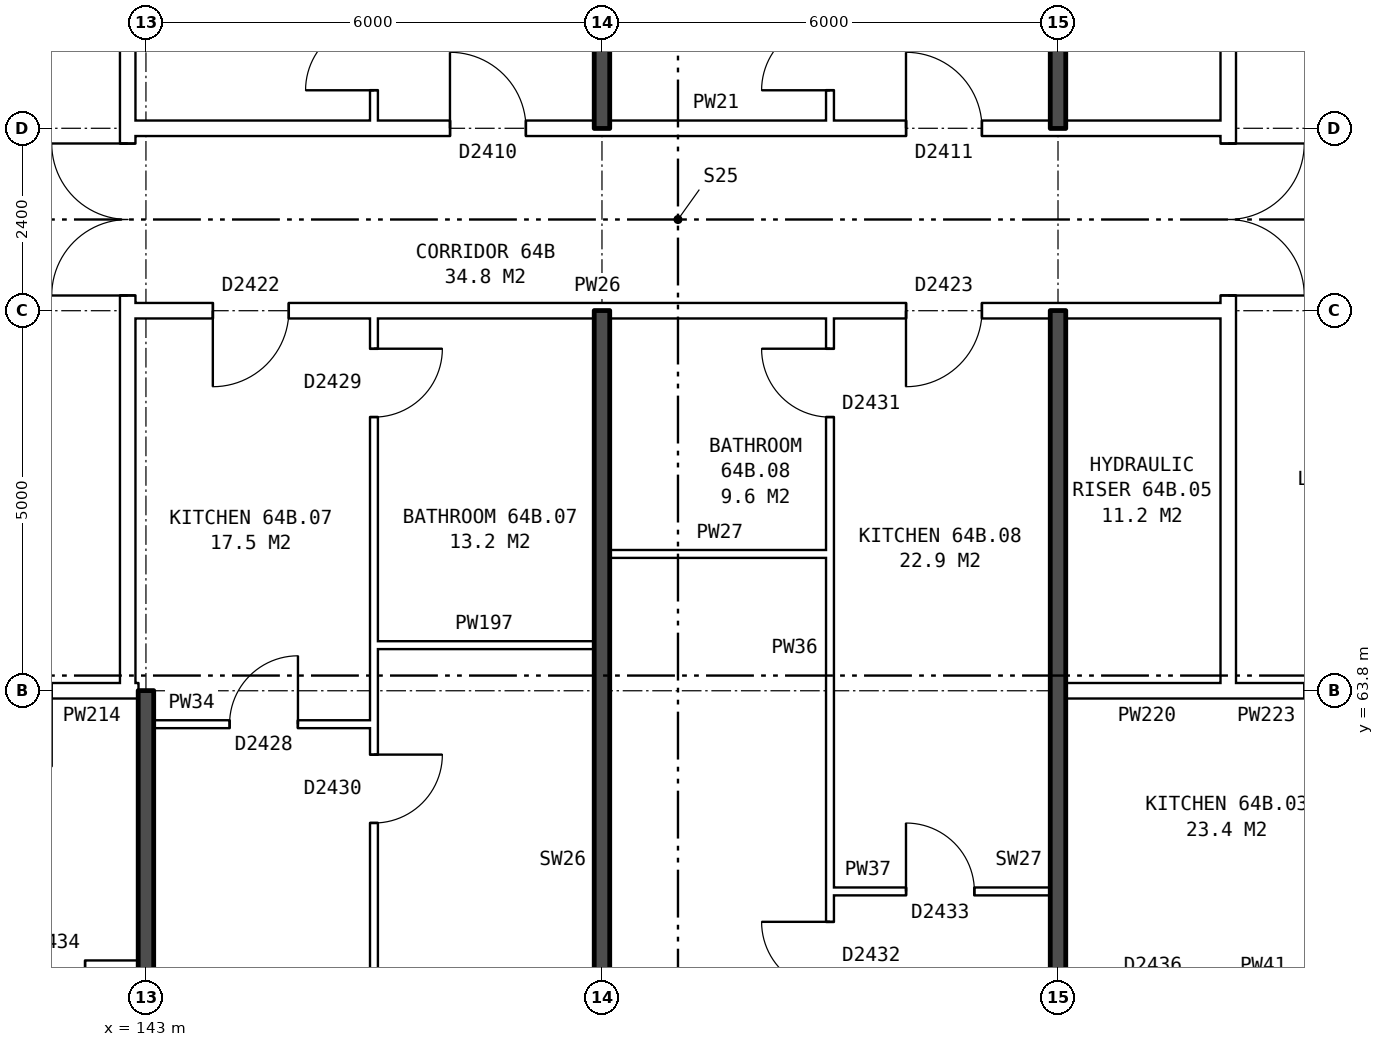
"""IFC4 building model, lengths in metres.
Left out: names, types, materials, properties, quantities, classifications, styles, units other than length and angle.
Written with IfcOpenShell. Run it as: python <this file> out.ifc"""

import sys

from ifc_helpers import new_model, si_unit, direction, frame, frame_2d, origin, place, context, subcontext, project, spatial, rectangle, extrude, element, fill, save


model = new_model("IFC4")
c1 = context("Model", 3, precision=1e-05, world=origin(), true_north=direction((0.0, 1.0)))
c2 = subcontext(c1, "Body", "Model", "MODEL_VIEW")
j1 = project(units=[si_unit("LENGTHUNIT", "METRE"), si_unit("PLANEANGLEUNIT", "RADIAN")], contexts=[c1])
p1 = place(None, origin())
s1 = spatial("IfcSite", under=j1, at=p1, CompositionType="ELEMENT")
p2 = place(p1, origin())
s2 = spatial("IfcBuilding", under=s1, at=p2, CompositionType="ELEMENT")
p3 = place(p2, frame((0.0, 0.0, 227.6)))
s3 = spatial("IfcBuildingStorey", under=s2, at=p3, CompositionType="ELEMENT", Elevation=227.6)
p4 = place(p3, frame((142.76, 63.9, 0.0), z_axis=(0.0, 0.0, 1.0), x_axis=(0.0, 1.0, 0.0)))
e1 = element("IfcWall", 1, at=p4, inside=s3, PredefinedType="PARTITIONING", context=c2, shape_type="SweptSolid", body=[
    extrude(rectangle(XDim=12.2, YDim=0.2, at=frame_2d((6.1, 0.0))), origin(), (0.0, 0.0, 1.0), 2.85),
])
p5 = place(p4, frame((5.1, 0.0, 0.0)))
e2 = element("IfcOpeningElement", 2, at=p5, cuts=e1, PredefinedType="OPENING", context=c2, shape_type="SweptSolid", body=[
    extrude(rectangle(XDim=2.0, YDim=2.1, at=frame_2d((1.0, 1.05))), frame((0.0, 0.11, 0.0), z_axis=(0.0, -1.0, 0.0), x_axis=(1.0, 0.0, 0.0)), (0.0, 0.0, 1.0), 0.22),
])
p6 = place(p3, frame((157.24, 63.9, 0.0), z_axis=(0.0, 0.0, 1.0), x_axis=(0.0, 1.0, 0.0)))
e3 = element("IfcWall", 3, at=p6, inside=s3, PredefinedType="PARTITIONING", context=c2, shape_type="SweptSolid", body=[
    extrude(rectangle(XDim=12.2, YDim=0.2, at=frame_2d((6.1, 0.0))), origin(), (0.0, 0.0, 1.0), 2.85),
])
p7 = place(p6, frame((5.1, 0.0, 0.0)))
e4 = element("IfcOpeningElement", 4, at=p7, cuts=e3, PredefinedType="OPENING", context=c2, shape_type="SweptSolid", body=[
    extrude(rectangle(XDim=2.0, YDim=2.1, at=frame_2d((1.0, 1.05))), frame((0.0, 0.11, 0.0), z_axis=(0.0, -1.0, 0.0), x_axis=(1.0, 0.0, 0.0)), (0.0, 0.0, 1.0), 0.22),
])
p8 = place(p3, frame((137.1, 60.2, 0.0), z_axis=(0.0, 0.0, 1.0), x_axis=(1.0, 0.0, 0.0)))
e5 = element("IfcWall", 5, at=p8, inside=s3, PredefinedType="PARTITIONING", context=c2, shape_type="SweptSolid", body=[
    extrude(rectangle(XDim=5.8, YDim=0.1, at=frame_2d((2.9, 0.0))), origin(), (0.0, 0.0, 1.0), 2.85),
])
p9 = place(p8, frame((1.3, 0.0, 0.0)))
e6 = element("IfcOpeningElement", 6, at=p9, cuts=e5, PredefinedType="OPENING", context=c2, shape_type="SweptSolid", body=[
    extrude(rectangle(XDim=0.9, YDim=2.1, at=frame_2d((0.45, 1.05))), frame((0.0, 0.06, 0.0), z_axis=(0.0, -1.0, 0.0), x_axis=(1.0, 0.0, 0.0)), (0.0, 0.0, 1.0), 0.12),
])
p10 = place(p8, frame((4.2, 0.0, 0.0)))
e7 = element("IfcOpeningElement", 7, at=p10, cuts=e5, PredefinedType="OPENING", context=c2, shape_type="SweptSolid", body=[
    extrude(rectangle(XDim=0.9, YDim=2.1, at=frame_2d((0.45, 1.05))), frame((0.0, 0.06, 0.0), z_axis=(0.0, -1.0, 0.0), x_axis=(1.0, 0.0, 0.0)), (0.0, 0.0, 1.0), 0.12),
])
p11 = place(p3, frame((152.0, 61.16, 0.0), z_axis=(0.0, 0.0, 1.0), x_axis=(1.0, 0.0, 0.0)))
e8 = element("IfcWall", 8, at=p11, inside=s3, PredefinedType="PARTITIONING", context=c2, shape_type="SweptSolid", body=[
    extrude(rectangle(XDim=2.9, YDim=0.1, at=frame_2d((1.45, 0.0))), origin(), (0.0, 0.0, 1.0), 2.85),
])
p12 = place(p11, frame((1.0, 0.0, 0.0)))
e9 = element("IfcOpeningElement", 9, at=p12, cuts=e8, PredefinedType="OPENING", context=c2, shape_type="SweptSolid", body=[
    extrude(rectangle(XDim=0.9, YDim=2.1, at=frame_2d((0.45, 1.05))), frame((0.0, 0.06, 0.0), z_axis=(0.0, -1.0, 0.0), x_axis=(1.0, 0.0, 0.0)), (0.0, 0.0, 1.0), 0.12),
])
p13 = place(p3, frame((143.1, 63.36, 0.0), z_axis=(0.0, 0.0, 1.0), x_axis=(1.0, 0.0, 0.0)))
e10 = element("IfcWall", 10, at=p13, inside=s3, PredefinedType="PARTITIONING", context=c2, shape_type="SweptSolid", body=[
    extrude(rectangle(XDim=2.9, YDim=0.1, at=frame_2d((1.45, 0.0))), origin(), (0.0, 0.0, 1.0), 2.85),
])
p14 = place(p13, frame((1.0, 0.0, 0.0)))
e11 = element("IfcOpeningElement", 11, at=p14, cuts=e10, PredefinedType="OPENING", context=c2, shape_type="SweptSolid", body=[
    extrude(rectangle(XDim=0.9, YDim=2.1, at=frame_2d((0.45, 1.05))), frame((0.0, 0.06, 0.0), z_axis=(0.0, -1.0, 0.0), x_axis=(1.0, 0.0, 0.0)), (0.0, 0.0, 1.0), 0.12),
])
p15 = place(p3, frame((139.76, 63.8, 0.0), z_axis=(0.0, 0.0, 1.0), x_axis=(1.0, 0.0, 0.0)))
e12 = element("IfcWall", 12, at=p15, inside=s3, PredefinedType="PARTITIONING", context=c2, shape_type="SweptSolid", body=[
    extrude(rectangle(XDim=3.0, YDim=0.2, at=frame_2d((1.5, 0.0))), origin(), (0.0, 0.0, 1.0), 2.85),
])
p16 = place(p15, frame((1.0, 0.0, 0.0)))
e13 = element("IfcOpeningElement", 13, at=p16, cuts=e12, PredefinedType="OPENING", context=c2, shape_type="SweptSolid", body=[
    extrude(rectangle(XDim=1.0, YDim=2.1, at=frame_2d((0.5, 1.05))), frame((0.0, 0.11, 0.0), z_axis=(0.0, -1.0, 0.0), x_axis=(1.0, 0.0, 0.0)), (0.0, 0.0, 1.0), 0.22),
])
p17 = place(p3, frame((142.76, 63.8, 0.0), z_axis=(0.0, 0.0, 1.0), x_axis=(1.0, 0.0, 0.0)))
e14 = element("IfcWall", 14, at=p17, inside=s3, PredefinedType="PARTITIONING", context=c2, shape_type="SweptSolid", body=[
    extrude(rectangle(XDim=0.14, YDim=0.2, at=frame_2d((0.07, 0.0))), origin(), (0.0, 0.0, 1.0), 2.85),
])
p18 = place(p3, frame((155.1, 63.8, 0.0), z_axis=(0.0, 0.0, 1.0), x_axis=(1.0, 0.0, 0.0)))
e15 = element("IfcWall", 15, at=p18, inside=s3, PredefinedType="PARTITIONING", context=c2, shape_type="SweptSolid", body=[
    extrude(rectangle(XDim=2.14, YDim=0.2, at=frame_2d((1.07, 0.0))), origin(), (0.0, 0.0, 1.0), 2.85),
])
p19 = place(p3, frame((157.24, 63.8, 0.0), z_axis=(0.0, 0.0, 1.0), x_axis=(1.0, 0.0, 0.0)))
e16 = element("IfcWall", 16, at=p19, inside=s3, PredefinedType="PARTITIONING", context=c2, shape_type="SweptSolid", body=[
    extrude(rectangle(XDim=3.0, YDim=0.2, at=frame_2d((1.5, 0.0))), origin(), (0.0, 0.0, 1.0), 2.85),
])
p20 = place(p19, frame((1.0, 0.0, 0.0)))
e17 = element("IfcOpeningElement", 17, at=p20, cuts=e16, PredefinedType="OPENING", context=c2, shape_type="SweptSolid", body=[
    extrude(rectangle(XDim=1.0, YDim=2.1, at=frame_2d((0.5, 1.05))), frame((0.0, 0.11, 0.0), z_axis=(0.0, -1.0, 0.0), x_axis=(1.0, 0.0, 0.0)), (0.0, 0.0, 1.0), 0.22),
])
for number, where, z_axis, x_axis in (
    (18, (146.0, 64.4, 0.0), (0.0, 0.0, 1.0), (1.0, 0.0, 0.0)),
    (19, (149.1, 65.6, 0.0), (0.0, 0.0, 1.0), (1.0, 0.0, 0.0)),
):
    element("IfcWall", number, at=place(p3, frame(where, z_axis=z_axis, x_axis=x_axis)), inside=s3, PredefinedType="PARTITIONING", context=c2, shape_type="SweptSolid", body=[
        extrude(rectangle(XDim=2.9, YDim=0.1, at=frame_2d((1.45, 0.0))), origin(), (0.0, 0.0, 1.0), 2.85),
    ])
p21 = place(p3, frame((142.76, 68.8, 0.0), z_axis=(0.0, 0.0, 1.0), x_axis=(1.0, 0.0, 0.0)))
e20 = element("IfcWall", 20, at=p21, inside=s3, PredefinedType="PARTITIONING", context=c2, shape_type="SweptSolid", body=[
    extrude(rectangle(XDim=14.48, YDim=0.2, at=frame_2d((7.24, 0.0))), origin(), (0.0, 0.0, 1.0), 2.85),
])
p22 = place(p21, frame((1.12, 0.0, 0.0)))
e21 = element("IfcOpeningElement", 21, at=p22, cuts=e20, PredefinedType="OPENING", context=c2, shape_type="SweptSolid", body=[
    extrude(rectangle(XDim=1.0, YDim=2.1, at=frame_2d((0.5, 1.05))), frame((0.0, 0.11, 0.0), z_axis=(0.0, -1.0, 0.0), x_axis=(1.0, 0.0, 0.0)), (0.0, 0.0, 1.0), 0.22),
])
p23 = place(p21, frame((10.24, 0.0, 0.0)))
e22 = element("IfcOpeningElement", 22, at=p23, cuts=e20, PredefinedType="OPENING", context=c2, shape_type="SweptSolid", body=[
    extrude(rectangle(XDim=1.0, YDim=2.1, at=frame_2d((0.5, 1.05))), frame((0.0, 0.11, 0.0), z_axis=(0.0, -1.0, 0.0), x_axis=(1.0, 0.0, 0.0)), (0.0, 0.0, 1.0), 0.22),
])
p24 = place(p3, frame((142.76, 71.2, 0.0), z_axis=(0.0, 0.0, 1.0), x_axis=(1.0, 0.0, 0.0)))
e23 = element("IfcWall", 23, at=p24, inside=s3, PredefinedType="PARTITIONING", context=c2, shape_type="SweptSolid", body=[
    extrude(rectangle(XDim=14.48, YDim=0.2, at=frame_2d((7.24, 0.0))), origin(), (0.0, 0.0, 1.0), 2.85),
])
p25 = place(p24, frame((4.24, 0.0, 0.0)))
e24 = element("IfcOpeningElement", 24, at=p25, cuts=e23, PredefinedType="OPENING", context=c2, shape_type="SweptSolid", body=[
    extrude(rectangle(XDim=1.0, YDim=2.1, at=frame_2d((0.5, 1.05))), frame((0.0, 0.11, 0.0), z_axis=(0.0, -1.0, 0.0), x_axis=(1.0, 0.0, 0.0)), (0.0, 0.0, 1.0), 0.22),
])
p26 = place(p24, frame((10.24, 0.0, 0.0)))
e25 = element("IfcOpeningElement", 25, at=p26, cuts=e23, PredefinedType="OPENING", context=c2, shape_type="SweptSolid", body=[
    extrude(rectangle(XDim=1.0, YDim=2.1, at=frame_2d((0.5, 1.05))), frame((0.0, 0.11, 0.0), z_axis=(0.0, -1.0, 0.0), x_axis=(1.0, 0.0, 0.0)), (0.0, 0.0, 1.0), 0.22),
])
p27 = place(p3, frame((143.0, 54.36, 0.0), z_axis=(0.0, 0.0, 1.0), x_axis=(0.0, 1.0, 0.0)))
e26 = element("IfcWall", 26, at=p27, inside=s3, PredefinedType="SOLIDWALL", context=c2, shape_type="SweptSolid", body=[
    extrude(rectangle(XDim=9.44, YDim=0.2, at=frame_2d((4.72, 0.0))), origin(), (0.0, 0.0, 1.0), 2.85),
])
p28 = place(p3, frame((146.0, 54.36, 0.0), z_axis=(0.0, 0.0, 1.0), x_axis=(0.0, 1.0, 0.0)))
e27 = element("IfcWall", 27, at=p28, inside=s3, PredefinedType="PARTITIONING", context=c2, shape_type="SweptSolid", body=[
    extrude(rectangle(XDim=14.34, YDim=0.1, at=frame_2d((7.17, 0.0))), origin(), (0.0, 0.0, 1.0), 2.85),
])
p29 = place(p28, frame((7.7, 0.0, 0.0)))
e28 = element("IfcOpeningElement", 28, at=p29, cuts=e27, PredefinedType="OPENING", context=c2, shape_type="SweptSolid", body=[
    extrude(rectangle(XDim=0.9, YDim=2.1, at=frame_2d((0.45, 1.05))), frame((0.0, 0.06, 0.0), z_axis=(0.0, -1.0, 0.0), x_axis=(1.0, 0.0, 0.0)), (0.0, 0.0, 1.0), 0.12),
])
p30 = place(p28, frame((13.04, 0.0, 0.0)))
e29 = element("IfcOpeningElement", 29, at=p30, cuts=e27, PredefinedType="OPENING", context=c2, shape_type="SweptSolid", body=[
    extrude(rectangle(XDim=0.9, YDim=2.1, at=frame_2d((0.45, 1.05))), frame((0.0, 0.06, 0.0), z_axis=(0.0, -1.0, 0.0), x_axis=(1.0, 0.0, 0.0)), (0.0, 0.0, 1.0), 0.12),
])
p31 = place(p3, frame((146.0, 71.3, 0.0), z_axis=(0.0, 0.0, 1.0), x_axis=(0.0, 1.0, 0.0)))
e30 = element("IfcWall", 30, at=p31, inside=s3, PredefinedType="PARTITIONING", context=c2, shape_type="SweptSolid", body=[
    extrude(rectangle(XDim=14.34, YDim=0.1, at=frame_2d((7.17, 0.0))), origin(), (0.0, 0.0, 1.0), 2.85),
])
p32 = place(p31, frame((5.74, 0.0, 0.0)))
e31 = element("IfcOpeningElement", 31, at=p32, cuts=e30, PredefinedType="OPENING", context=c2, shape_type="SweptSolid", body=[
    extrude(rectangle(XDim=0.9, YDim=2.1, at=frame_2d((0.45, 1.05))), frame((0.0, 0.06, 0.0), z_axis=(0.0, -1.0, 0.0), x_axis=(1.0, 0.0, 0.0)), (0.0, 0.0, 1.0), 0.12),
])
p33 = place(p31, frame((0.4, 0.0, 0.0)))
e32 = element("IfcOpeningElement", 32, at=p33, cuts=e30, PredefinedType="OPENING", context=c2, shape_type="SweptSolid", body=[
    extrude(rectangle(XDim=0.9, YDim=2.1, at=frame_2d((0.45, 1.05))), frame((0.0, 0.06, 0.0), z_axis=(0.0, -1.0, 0.0), x_axis=(1.0, 0.0, 0.0)), (0.0, 0.0, 1.0), 0.12),
])
for number, where, z_axis, x_axis in (
    (33, (149.0, 54.36, 0.0), (0.0, 0.0, 1.0), (0.0, 1.0, 0.0)),
    (34, (149.0, 71.2, 0.0), (0.0, 0.0, 1.0), (0.0, 1.0, 0.0)),
):
    element("IfcWall", number, at=place(p3, frame(where, z_axis=z_axis, x_axis=x_axis)), inside=s3, PredefinedType="SOLIDWALL", context=c2, shape_type="SweptSolid", body=[
        extrude(rectangle(XDim=14.44, YDim=0.2, at=frame_2d((7.22, 0.0))), origin(), (0.0, 0.0, 1.0), 2.85),
    ])
p34 = place(p3, frame((152.0, 54.36, 0.0), z_axis=(0.0, 0.0, 1.0), x_axis=(0.0, 1.0, 0.0)))
e35 = element("IfcWall", 35, at=p34, inside=s3, PredefinedType="PARTITIONING", context=c2, shape_type="SweptSolid", body=[
    extrude(rectangle(XDim=14.34, YDim=0.1, at=frame_2d((7.17, 0.0))), origin(), (0.0, 0.0, 1.0), 2.85),
])
p35 = place(p34, frame((5.5, 0.0, 0.0)))
e36 = element("IfcOpeningElement", 36, at=p35, cuts=e35, PredefinedType="OPENING", context=c2, shape_type="SweptSolid", body=[
    extrude(rectangle(XDim=0.9, YDim=2.1, at=frame_2d((0.45, 1.05))), frame((0.0, 0.06, 0.0), z_axis=(0.0, -1.0, 0.0), x_axis=(1.0, 0.0, 0.0)), (0.0, 0.0, 1.0), 0.12),
])
p36 = place(p34, frame((13.04, 0.0, 0.0)))
e37 = element("IfcOpeningElement", 37, at=p36, cuts=e35, PredefinedType="OPENING", context=c2, shape_type="SweptSolid", body=[
    extrude(rectangle(XDim=0.9, YDim=2.1, at=frame_2d((0.45, 1.05))), frame((0.0, 0.06, 0.0), z_axis=(0.0, -1.0, 0.0), x_axis=(1.0, 0.0, 0.0)), (0.0, 0.0, 1.0), 0.12),
])
p37 = place(p3, frame((152.0, 71.3, 0.0), z_axis=(0.0, 0.0, 1.0), x_axis=(0.0, 1.0, 0.0)))
e38 = element("IfcWall", 38, at=p37, inside=s3, PredefinedType="PARTITIONING", context=c2, shape_type="SweptSolid", body=[
    extrude(rectangle(XDim=14.34, YDim=0.1, at=frame_2d((7.17, 0.0))), origin(), (0.0, 0.0, 1.0), 2.85),
])
p38 = place(p37, frame((6.74, 0.0, 0.0)))
e39 = element("IfcOpeningElement", 39, at=p38, cuts=e38, PredefinedType="OPENING", context=c2, shape_type="SweptSolid", body=[
    extrude(rectangle(XDim=0.9, YDim=2.1, at=frame_2d((0.45, 1.05))), frame((0.0, 0.06, 0.0), z_axis=(0.0, -1.0, 0.0), x_axis=(1.0, 0.0, 0.0)), (0.0, 0.0, 1.0), 0.12),
])
p39 = place(p37, frame((0.4, 0.0, 0.0)))
e40 = element("IfcOpeningElement", 40, at=p39, cuts=e38, PredefinedType="OPENING", context=c2, shape_type="SweptSolid", body=[
    extrude(rectangle(XDim=0.9, YDim=2.1, at=frame_2d((0.45, 1.05))), frame((0.0, 0.06, 0.0), z_axis=(0.0, -1.0, 0.0), x_axis=(1.0, 0.0, 0.0)), (0.0, 0.0, 1.0), 0.12),
])
for number, where, z_axis, x_axis in (
    (41, (155.0, 54.36, 0.0), (0.0, 0.0, 1.0), (0.0, 1.0, 0.0)),
    (42, (155.0, 71.2, 0.0), (0.0, 0.0, 1.0), (0.0, 1.0, 0.0)),
):
    element("IfcWall", number, at=place(p3, frame(where, z_axis=z_axis, x_axis=x_axis)), inside=s3, PredefinedType="SOLIDWALL", context=c2, shape_type="SweptSolid", body=[
        extrude(rectangle(XDim=14.44, YDim=0.2, at=frame_2d((7.22, 0.0))), origin(), (0.0, 0.0, 1.0), 2.85),
    ])
p40 = place(p5, origin())
e43 = element("IfcDoor", 43, at=p40, inside=s3, OperationType="DOUBLE_DOOR_SINGLE_SWING", PredefinedType="DOOR", context=c2, shape_type="SweptSolid", body=[
    extrude(rectangle(XDim=2.0, YDim=2.1, at=frame_2d((1.0, 1.05))), frame((0.0, 0.025, 0.0), z_axis=(0.0, -1.0, 0.0), x_axis=(1.0, 0.0, 0.0)), (0.0, 0.0, 1.0), 0.05),
])
fill(e2, e43)
p41 = place(p7, frame((2.0, 0.0, 0.0), z_axis=(0.0, 0.0, 1.0), x_axis=(-1.0, 0.0, 0.0)))
e44 = element("IfcDoor", 44, at=p41, inside=s3, OperationType="DOUBLE_DOOR_SINGLE_SWING", PredefinedType="DOOR", context=c2, shape_type="SweptSolid", body=[
    extrude(rectangle(XDim=2.0, YDim=2.1, at=frame_2d((1.0, 1.05))), frame((0.0, 0.025, 0.0), z_axis=(0.0, -1.0, 0.0), x_axis=(1.0, 0.0, 0.0)), (0.0, 0.0, 1.0), 0.05),
])
fill(e4, e44)
p42 = place(p10, frame((0.9, 0.0, 0.0), z_axis=(0.0, 0.0, 1.0), x_axis=(-1.0, 0.0, 0.0)))
e45 = element("IfcDoor", 45, at=p42, inside=s3, OperationType="SINGLE_SWING_RIGHT", PredefinedType="DOOR", context=c2, shape_type="SweptSolid", body=[
    extrude(rectangle(XDim=0.9, YDim=2.1, at=frame_2d((0.45, 1.05))), frame((0.0, 0.025, 0.0), z_axis=(0.0, -1.0, 0.0), x_axis=(1.0, 0.0, 0.0)), (0.0, 0.0, 1.0), 0.05),
])
fill(e7, e45)
p43 = place(p29, frame((0.9, 0.0, 0.0), z_axis=(0.0, 0.0, 1.0), x_axis=(-1.0, 0.0, 0.0)))
e46 = element("IfcDoor", 46, at=p43, inside=s3, OperationType="SINGLE_SWING_LEFT", PredefinedType="DOOR", context=c2, shape_type="SweptSolid", body=[
    extrude(rectangle(XDim=0.9, YDim=2.1, at=frame_2d((0.45, 1.05))), frame((0.0, 0.025, 0.0), z_axis=(0.0, -1.0, 0.0), x_axis=(1.0, 0.0, 0.0)), (0.0, 0.0, 1.0), 0.05),
])
fill(e28, e46)
p44 = place(p22, frame((1.0, 0.0, 0.0), z_axis=(0.0, 0.0, 1.0), x_axis=(-1.0, 0.0, 0.0)))
e47 = element("IfcDoor", 47, at=p44, inside=s3, OperationType="SINGLE_SWING_RIGHT", PredefinedType="DOOR", context=c2, shape_type="SweptSolid", body=[
    extrude(rectangle(XDim=1.0, YDim=2.1, at=frame_2d((0.5, 1.05))), frame((0.0, 0.025, 0.0), z_axis=(0.0, -1.0, 0.0), x_axis=(1.0, 0.0, 0.0)), (0.0, 0.0, 1.0), 0.05),
])
fill(e21, e47)
p45 = place(p14, origin())
e48 = element("IfcDoor", 48, at=p45, inside=s3, OperationType="SINGLE_SWING_RIGHT", PredefinedType="DOOR", context=c2, shape_type="SweptSolid", body=[
    extrude(rectangle(XDim=0.9, YDim=2.1, at=frame_2d((0.45, 1.05))), frame((0.0, 0.025, 0.0), z_axis=(0.0, -1.0, 0.0), x_axis=(1.0, 0.0, 0.0)), (0.0, 0.0, 1.0), 0.05),
])
fill(e11, e48)
p46 = place(p30, frame((0.9, 0.0, 0.0), z_axis=(0.0, 0.0, 1.0), x_axis=(-1.0, 0.0, 0.0)))
e49 = element("IfcDoor", 49, at=p46, inside=s3, OperationType="SINGLE_SWING_LEFT", PredefinedType="DOOR", context=c2, shape_type="SweptSolid", body=[
    extrude(rectangle(XDim=0.9, YDim=2.1, at=frame_2d((0.45, 1.05))), frame((0.0, 0.025, 0.0), z_axis=(0.0, -1.0, 0.0), x_axis=(1.0, 0.0, 0.0)), (0.0, 0.0, 1.0), 0.05),
])
fill(e29, e49)
p47 = place(p35, origin())
e50 = element("IfcDoor", 50, at=p47, inside=s3, OperationType="SINGLE_SWING_RIGHT", PredefinedType="DOOR", context=c2, shape_type="SweptSolid", body=[
    extrude(rectangle(XDim=0.9, YDim=2.1, at=frame_2d((0.45, 1.05))), frame((0.0, 0.025, 0.0), z_axis=(0.0, -1.0, 0.0), x_axis=(1.0, 0.0, 0.0)), (0.0, 0.0, 1.0), 0.05),
])
fill(e36, e50)
p48 = place(p23, frame((1.0, 0.0, 0.0), z_axis=(0.0, 0.0, 1.0), x_axis=(-1.0, 0.0, 0.0)))
e51 = element("IfcDoor", 51, at=p48, inside=s3, OperationType="SINGLE_SWING_RIGHT", PredefinedType="DOOR", context=c2, shape_type="SweptSolid", body=[
    extrude(rectangle(XDim=1.0, YDim=2.1, at=frame_2d((0.5, 1.05))), frame((0.0, 0.025, 0.0), z_axis=(0.0, -1.0, 0.0), x_axis=(1.0, 0.0, 0.0)), (0.0, 0.0, 1.0), 0.05),
])
fill(e22, e51)
p49 = place(p12, origin())
e52 = element("IfcDoor", 52, at=p49, inside=s3, OperationType="SINGLE_SWING_LEFT", PredefinedType="DOOR", context=c2, shape_type="SweptSolid", body=[
    extrude(rectangle(XDim=0.9, YDim=2.1, at=frame_2d((0.45, 1.05))), frame((0.0, 0.025, 0.0), z_axis=(0.0, -1.0, 0.0), x_axis=(1.0, 0.0, 0.0)), (0.0, 0.0, 1.0), 0.05),
])
fill(e9, e52)
p50 = place(p36, origin())
e53 = element("IfcDoor", 53, at=p50, inside=s3, OperationType="SINGLE_SWING_RIGHT", PredefinedType="DOOR", context=c2, shape_type="SweptSolid", body=[
    extrude(rectangle(XDim=0.9, YDim=2.1, at=frame_2d((0.45, 1.05))), frame((0.0, 0.025, 0.0), z_axis=(0.0, -1.0, 0.0), x_axis=(1.0, 0.0, 0.0)), (0.0, 0.0, 1.0), 0.05),
])
fill(e37, e53)
p51 = place(p25, origin())
e54 = element("IfcDoor", 54, at=p51, inside=s3, OperationType="SINGLE_SWING_LEFT", PredefinedType="DOOR", context=c2, shape_type="SweptSolid", body=[
    extrude(rectangle(XDim=1.0, YDim=2.1, at=frame_2d((0.5, 1.05))), frame((0.0, 0.025, 0.0), z_axis=(0.0, -1.0, 0.0), x_axis=(1.0, 0.0, 0.0)), (0.0, 0.0, 1.0), 0.05),
])
fill(e24, e54)
p52 = place(p33, origin())
e55 = element("IfcDoor", 55, at=p52, inside=s3, OperationType="SINGLE_SWING_LEFT", PredefinedType="DOOR", context=c2, shape_type="SweptSolid", body=[
    extrude(rectangle(XDim=0.9, YDim=2.1, at=frame_2d((0.45, 1.05))), frame((0.0, 0.025, 0.0), z_axis=(0.0, -1.0, 0.0), x_axis=(1.0, 0.0, 0.0)), (0.0, 0.0, 1.0), 0.05),
])
fill(e32, e55)
p53 = place(p26, origin())
e56 = element("IfcDoor", 56, at=p53, inside=s3, OperationType="SINGLE_SWING_LEFT", PredefinedType="DOOR", context=c2, shape_type="SweptSolid", body=[
    extrude(rectangle(XDim=1.0, YDim=2.1, at=frame_2d((0.5, 1.05))), frame((0.0, 0.025, 0.0), z_axis=(0.0, -1.0, 0.0), x_axis=(1.0, 0.0, 0.0)), (0.0, 0.0, 1.0), 0.05),
])
fill(e25, e56)
p54 = place(p39, origin())
e57 = element("IfcDoor", 57, at=p54, inside=s3, OperationType="SINGLE_SWING_LEFT", PredefinedType="DOOR", context=c2, shape_type="SweptSolid", body=[
    extrude(rectangle(XDim=0.9, YDim=2.1, at=frame_2d((0.45, 1.05))), frame((0.0, 0.025, 0.0), z_axis=(0.0, -1.0, 0.0), x_axis=(1.0, 0.0, 0.0)), (0.0, 0.0, 1.0), 0.05),
])
fill(e40, e57)
save(model, sys.argv[1])
